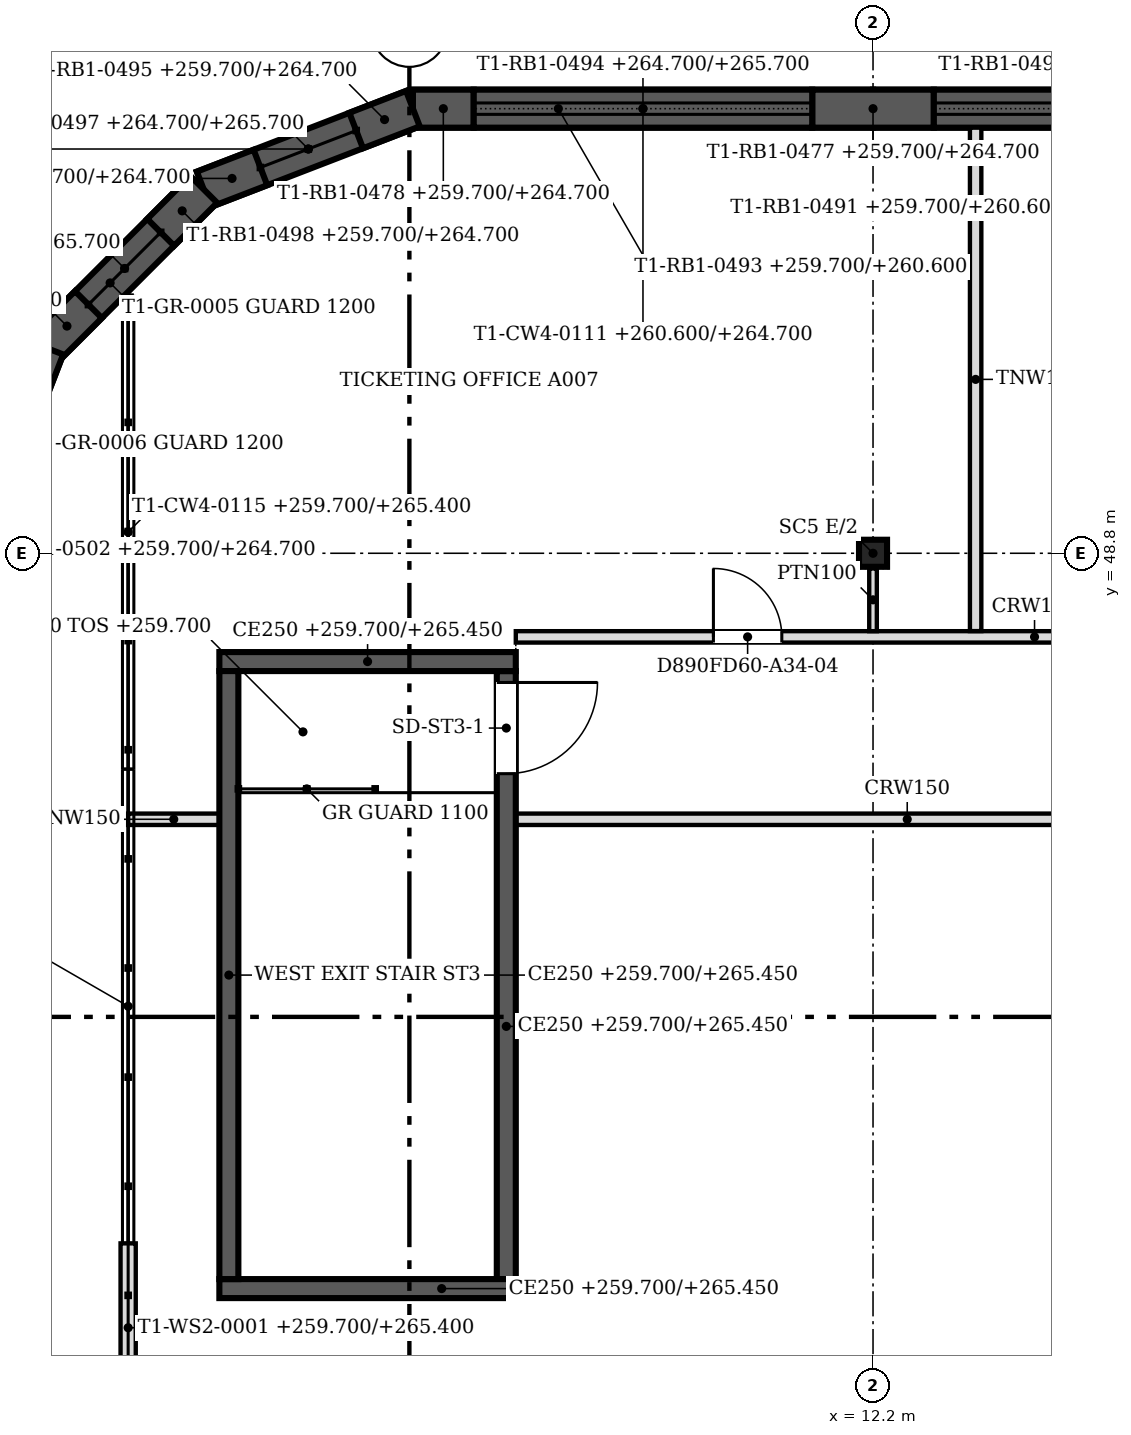
"""IFC4 building model, lengths in metres.
Left out: names, types, materials, properties, quantities, classifications, styles, units other than length and angle.
Written with IfcOpenShell. Run it as: python <this file> out.ifc"""

import sys

from ifc_helpers import new_model, si_unit, direction, frame, frame_2d, origin, origin_2d, place, context, subcontext, project, spatial, polyline, rectangle, i_section, outline, extrude, faceted_brep, source, transform, mapped, element, fill, save


model = new_model("IFC4")
c1 = context("Model", 3, precision=1e-05, world=origin(), true_north=direction((0.0, 1.0)))
c2 = subcontext(c1, "Body", "Model", "MODEL_VIEW")
j1 = project(units=[si_unit("LENGTHUNIT", "METRE"), si_unit("PLANEANGLEUNIT", "RADIAN")], contexts=[c1])
p1 = place(None, origin())
s1 = spatial("IfcSite", under=j1, at=p1, CompositionType="ELEMENT")
p2 = place(p1, origin())
s2 = spatial("IfcBuilding", under=s1, at=p2, CompositionType="ELEMENT")
p3 = place(p2, frame((0.0, 0.0, 259.7)))
s3 = spatial("IfcBuildingStorey", under=s2, at=p3, CompositionType="ELEMENT", Elevation=259.7)
p4 = place(p3, frame((12.2, 48.8, 0.0), z_axis=(0.0, 0.0, 1.0), x_axis=(1.0, 0.0, 0.0)))
e1 = element("IfcColumn", 1, at=p4, inside=s3, PredefinedType="COLUMN", context=c2, shape_type="SweptSolid", body=[
    extrude(i_section(OverallWidth=0.369, OverallDepth=0.356, WebThickness=0.011, FlangeThickness=0.018, at=origin_2d()), origin(), (0.0, 0.0, 1.0), 5.7),
])
m1 = source(origin(), c2, "Body", "SweptSolid", [
    extrude(outline(polyline([(0.0, 0.0), (1.6, 0.0), (1.6, 5.0), (0.0, 5.0), (0.0, 0.0)])), frame((0.0, 0.25, 0.0), z_axis=(0.0, -1.0, 0.0), x_axis=(1.0, 0.0, 0.0)), (0.0, 0.0, 1.0), 0.5),
])
p5 = place(p3, frame((13.0, 54.65, 0.0), z_axis=(0.0, 0.0, 1.0), x_axis=(-1.0, 0.0, 0.0)))
e2 = element("IfcWall", 2, at=p5, inside=s3, PredefinedType="SOLIDWALL", context=c2, shape_type="MappedRepresentation", body=[
    mapped(m1, transform((0.0, 0.0, 0.0), scale=1.0)),
])
m2 = source(origin(), c2, "Body", "Brep", [
    faceted_brep([(0.0, -0.25, 0.0), (0.8, -0.25, 0.0), (0.8, -0.25, 5.0), (0.0, -0.25, 5.0), (0.0, 0.25, 5.0), (0.753, 0.25, 5.0), (0.753, 0.25, 0.0), (0.0, 0.25, 0.0), (0.8, -0.0, 0.0), (0.8, -0.0, 5.0)], [[[0, 1, 2, 3]], [[4, 5, 6, 7]], [[7, 6, 8, 1, 0]], [[9, 2, 1, 8]], [[5, 4, 3, 2, 9]], [[4, 7, 0, 3]], [[8, 6, 5, 9]]]),
])
p6 = place(p3, frame((6.947, 54.65, 0.0), z_axis=(0.0, 0.0, 1.0), x_axis=(-1.0, 0.0, 0.0)))
e3 = element("IfcWall", 3, at=p6, inside=s3, PredefinedType="SOLIDWALL", context=c2, shape_type="MappedRepresentation", body=[
    mapped(m2, transform((0.0, 0.0, 0.0), scale=1.0)),
])
m3 = source(origin(), c2, "Body", "SweptSolid", [
    extrude(outline(polyline([(0.0, 0.0), (4.5, 0.0), (4.5, 0.9), (0.0, 0.9), (0.0, 0.0)])), frame((0.0, 0.25, 0.0), z_axis=(0.0, -1.0, 0.0), x_axis=(1.0, 0.0, 0.0)), (0.0, 0.0, 1.0), 0.5),
])
p7 = place(p3, frame((17.5, 54.65, 0.0), z_axis=(0.0, 0.0, 1.0), x_axis=(-1.0, 0.0, 0.0)))
e4 = element("IfcWall", 4, at=p7, inside=s3, PredefinedType="SOLIDWALL", context=c2, shape_type="MappedRepresentation", body=[
    mapped(m3, transform((0.0, 0.0, 0.0), scale=1.0)),
])
m4 = source(origin(), c2, "Body", "SweptSolid", [
    extrude(outline(polyline([(0.0, 0.0), (6.1, 0.0), (6.1, 1.0), (0.0, 1.0), (0.0, 0.0)])), frame((0.0, 0.25, 0.0), z_axis=(0.0, -1.0, 0.0), x_axis=(1.0, 0.0, 0.0)), (0.0, 0.0, 1.0), 0.5),
])
p8 = place(p3, frame((18.3, 54.65, 5.0), z_axis=(0.0, 0.0, 1.0), x_axis=(-1.0, 0.0, 0.0)))
e5 = element("IfcWall", 5, at=p8, inside=s3, PredefinedType="SOLIDWALL", context=c2, shape_type="MappedRepresentation", body=[
    mapped(m4, transform((0.0, 0.0, 0.0), scale=1.0)),
])
m5 = source(origin(), c2, "Body", "SweptSolid", [
    extrude(outline(polyline([(0.0, 0.0), (4.453, 0.0), (4.453, 0.9), (0.0, 0.9), (0.0, 0.0)])), frame((0.0, 0.25, 0.0), z_axis=(0.0, -1.0, 0.0), x_axis=(1.0, 0.0, 0.0)), (0.0, 0.0, 1.0), 0.5),
])
p9 = place(p3, frame((11.4, 54.65, 0.0), z_axis=(0.0, 0.0, 1.0), x_axis=(-1.0, 0.0, 0.0)))
e6 = element("IfcWall", 6, at=p9, inside=s3, PredefinedType="SOLIDWALL", context=c2, shape_type="MappedRepresentation", body=[
    mapped(m5, transform((0.0, 0.0, 0.0), scale=1.0)),
])
m6 = source(origin(), c2, "Body", "Brep", [
    faceted_brep([(0.0, -0.25, 0.0), (6.053, -0.25, 0.0), (6.053, -0.25, 1.0), (0.0, -0.25, 1.0), (0.0, 0.25, 1.0), (6.007, 0.25, 1.0), (6.007, 0.25, 0.0), (0.0, 0.25, 0.0), (6.053, 0.0, 0.0), (6.053, 0.0, 1.0)], [[[0, 1, 2, 3]], [[4, 5, 6, 7]], [[7, 6, 8, 1, 0]], [[9, 2, 1, 8]], [[5, 4, 3, 2, 9]], [[4, 7, 0, 3]], [[8, 6, 5, 9]]]),
])
p10 = place(p3, frame((12.2, 54.65, 5.0), z_axis=(0.0, 0.0, 1.0), x_axis=(-1.0, 0.0, 0.0)))
e7 = element("IfcWall", 7, at=p10, inside=s3, PredefinedType="SOLIDWALL", context=c2, shape_type="MappedRepresentation", body=[
    mapped(m6, transform((0.0, 0.0, 0.0), scale=1.0)),
])
m7 = source(origin(), c2, "Body", "Brep", [
    faceted_brep([(0.0, -0.25, 0.0), (0.8, -0.25, 0.0), (0.8, -0.25, 5.0), (0.0, -0.25, 5.0), (0.047, 0.25, 5.0), (0.8, 0.25, 5.0), (0.8, 0.25, 0.0), (0.047, 0.25, 0.0), (0.0, 0.0, 0.0), (0.0, 0.0, 5.0)], [[[0, 1, 2, 3]], [[4, 5, 6, 7]], [[7, 6, 1, 0, 8]], [[5, 4, 9, 3, 2]], [[8, 0, 3, 9]], [[7, 8, 9, 4]], [[1, 6, 5, 2]]]),
])
p11 = place(p3, frame((6.146, 54.65, 0.0), z_axis=(0.0, 0.0, 1.0), x_axis=(-0.93301483327, -0.3598379092, 0.0)))
e8 = element("IfcWall", 8, at=p11, inside=s3, PredefinedType="SOLIDWALL", context=c2, shape_type="MappedRepresentation", body=[
    mapped(m7, transform((0.0, 0.0, 0.0), scale=1.0)),
])
m8 = source(origin(), c2, "Body", "Brep", [
    faceted_brep([(0.0, -0.25, 0.0), (0.8, -0.25, 0.0), (0.8, -0.25, 5.0), (0.0, -0.25, 5.0), (0.0, 0.25, 5.0), (0.747, 0.25, 5.0), (0.747, 0.25, 0.0), (0.0, 0.25, 0.0), (0.8, -0.0, 0.0), (0.8, -0.0, 5.0)], [[[0, 1, 2, 3]], [[4, 5, 6, 7]], [[7, 6, 8, 1, 0]], [[9, 2, 1, 8]], [[5, 4, 3, 2, 9]], [[4, 7, 0, 3]], [[8, 6, 5, 9]]]),
])
p12 = place(p3, frame((4.14, 53.876, 0.0), z_axis=(0.0, 0.0, 1.0), x_axis=(-0.93301483327, -0.3598379092, 0.0)))
e9 = element("IfcWall", 9, at=p12, inside=s3, PredefinedType="SOLIDWALL", context=c2, shape_type="MappedRepresentation", body=[
    mapped(m8, transform((0.0, 0.0, 0.0), scale=1.0)),
])
m9 = source(origin(), c2, "Body", "Brep", [
    faceted_brep([(0.0, -0.25, 0.0), (2.95, -0.25, 0.0), (2.95, -0.25, 1.0), (0.0, -0.25, 1.0), (0.047, 0.25, 1.0), (2.898, 0.25, 1.0), (2.898, 0.25, 0.0), (0.047, 0.25, 0.0), (2.95, 0.0, 0.0), (0.0, 0.0, 0.0), (2.95, 0.0, 1.0), (0.0, 0.0, 1.0)], [[[0, 1, 2, 3]], [[4, 5, 6, 7]], [[7, 6, 8, 1, 0, 9]], [[10, 2, 1, 8]], [[5, 4, 11, 3, 2, 10]], [[9, 0, 3, 11]], [[7, 9, 11, 4]], [[8, 6, 5, 10]]]),
])
p13 = place(p3, frame((6.146, 54.65, 5.0), z_axis=(0.0, 0.0, 1.0), x_axis=(-0.932999673775, -0.359877213415, 0.0)))
e10 = element("IfcWall", 10, at=p13, inside=s3, PredefinedType="SOLIDWALL", context=c2, shape_type="MappedRepresentation", body=[
    mapped(m9, transform((0.0, 0.0, 0.0), scale=1.0)),
])
m10 = source(origin(), c2, "Body", "Brep", [
    faceted_brep([(0.0, -0.25, 0.0), (0.8, -0.25, 0.0), (0.8, -0.25, 5.0), (0.0, -0.25, 5.0), (0.053, 0.25, 5.0), (0.8, 0.25, 5.0), (0.8, 0.25, 0.0), (0.053, 0.25, 0.0), (0.0, 0.0, 0.0), (0.0, 0.0, 5.0)], [[[0, 1, 2, 3]], [[4, 5, 6, 7]], [[7, 6, 1, 0, 8]], [[5, 4, 9, 3, 2]], [[8, 0, 3, 9]], [[7, 8, 9, 4]], [[1, 6, 5, 2]]]),
])
p14 = place(p3, frame((3.394, 53.588, 0.0), z_axis=(0.0, 0.0, 1.0), x_axis=(-0.707106781187, -0.707106781187, 0.0)))
e11 = element("IfcWall", 11, at=p14, inside=s3, PredefinedType="SOLIDWALL", context=c2, shape_type="MappedRepresentation", body=[
    mapped(m10, transform((0.0, 0.0, 0.0), scale=1.0)),
])
m11 = source(origin(), c2, "Body", "Brep", [
    faceted_brep([(0.0, -0.25, 0.0), (0.8, -0.25, 0.0), (0.8, -0.25, 5.0), (0.0, -0.25, 5.0), (0.0, 0.25, 5.0), (0.747, 0.25, 5.0), (0.747, 0.25, 0.0), (0.0, 0.25, 0.0), (0.8, -0.0, 0.0), (0.8, -0.0, 5.0)], [[[0, 1, 2, 3]], [[4, 5, 6, 7]], [[7, 6, 8, 1, 0]], [[9, 2, 1, 8]], [[5, 4, 3, 2, 9]], [[4, 7, 0, 3]], [[8, 6, 5, 9]]]),
])
p15 = place(p3, frame((1.878, 52.072, 0.0), z_axis=(0.0, 0.0, 1.0), x_axis=(-0.707259322823, -0.706954206636, 0.0)))
e12 = element("IfcWall", 12, at=p15, inside=s3, PredefinedType="SOLIDWALL", context=c2, shape_type="MappedRepresentation", body=[
    mapped(m11, transform((0.0, 0.0, 0.0), scale=1.0)),
])
m12 = source(origin(), c2, "Body", "Brep", [
    faceted_brep([(0.0, -0.25, 0.0), (2.944, -0.25, 0.0), (2.944, -0.25, 1.0), (0.0, -0.25, 1.0), (0.053, 0.25, 1.0), (2.891, 0.25, 1.0), (2.891, 0.25, 0.0), (0.053, 0.25, 0.0), (2.944, 0.0, 0.0), (0.0, 0.0, 0.0), (2.944, 0.0, 1.0), (0.0, 0.0, 1.0)], [[[0, 1, 2, 3]], [[4, 5, 6, 7]], [[7, 6, 8, 1, 0, 9]], [[10, 2, 1, 8]], [[5, 4, 11, 3, 2, 10]], [[9, 0, 3, 11]], [[7, 9, 11, 4]], [[8, 6, 5, 10]]]),
])
p16 = place(p3, frame((3.394, 53.588, 5.0), z_axis=(0.0, 0.0, 1.0), x_axis=(-0.707106781187, -0.707106781187, 0.0)))
e13 = element("IfcWall", 13, at=p16, inside=s3, PredefinedType="SOLIDWALL", context=c2, shape_type="MappedRepresentation", body=[
    mapped(m12, transform((0.0, 0.0, 0.0), scale=1.0)),
])
m13 = source(origin(), c2, "Body", "Brep", [
    faceted_brep([(0.0, -0.25, 0.0), (0.8, -0.25, 0.0), (0.8, -0.25, 5.0), (0.0, -0.25, 5.0), (0.053, 0.25, 5.0), (0.8, 0.25, 5.0), (0.8, 0.25, 0.0), (0.053, 0.25, 0.0), (0.0, 0.0, 0.0), (0.0, 0.0, 5.0)], [[[0, 1, 2, 3]], [[4, 5, 6, 7]], [[7, 6, 1, 0, 8]], [[5, 4, 9, 3, 2]], [[8, 0, 3, 9]], [[7, 8, 9, 4]], [[1, 6, 5, 2]]]),
])
p17 = place(p3, frame((1.312, 51.506, 0.0), z_axis=(0.0, 0.0, 1.0), x_axis=(-0.360001058183, -0.932951894851, 0.0)))
e14 = element("IfcWall", 14, at=p17, inside=s3, PredefinedType="SOLIDWALL", context=c2, shape_type="MappedRepresentation", body=[
    mapped(m13, transform((0.0, 0.0, 0.0), scale=1.0)),
])
m14 = source(origin(), c2, "Body", "Brep", [
    faceted_brep([(0.0, -0.25, 0.0), (2.95, -0.25, 0.0), (2.95, -0.25, 1.0), (0.0, -0.25, 1.0), (0.053, 0.25, 1.0), (2.904, 0.25, 1.0), (2.904, 0.25, 0.0), (0.053, 0.25, 0.0), (2.95, 0.0, 0.0), (0.0, 0.0, 0.0), (2.95, 0.0, 1.0), (0.0, 0.0, 1.0)], [[[0, 1, 2, 3]], [[4, 5, 6, 7]], [[7, 6, 8, 1, 0, 9]], [[10, 2, 1, 8]], [[5, 4, 11, 3, 2, 10]], [[9, 0, 3, 11]], [[7, 9, 11, 4]], [[8, 6, 5, 10]]]),
])
p18 = place(p3, frame((1.312, 51.506, 5.0), z_axis=(0.0, 0.0, 1.0), x_axis=(-0.359921456299, -0.932982607178, 0.0)))
e15 = element("IfcWall", 15, at=p18, inside=s3, PredefinedType="SOLIDWALL", context=c2, shape_type="MappedRepresentation", body=[
    mapped(m14, transform((0.0, 0.0, 0.0), scale=1.0)),
])
p19 = place(p3, frame((2.4, 33.48, 0.0), z_axis=(0.0, 0.0, 1.0), x_axis=(0.0, 1.0, 0.0)))
e16 = element("IfcWall", 16, at=p19, inside=s3, PredefinedType="PARTITIONING", context=c2, shape_type="SweptSolid", body=[
    extrude(rectangle(XDim=6.24, YDim=0.2, at=frame_2d((3.12, 0.0))), origin(), (0.0, 0.0, 1.0), 5.7),
])
m15 = source(origin(), c2, "Body", "SweptSolid", [
    extrude(rectangle(XDim=1.8, YDim=2.7, at=frame_2d((0.9, 1.35))), frame((0.0, 0.11, 0.0), z_axis=(0.0, -1.0, 0.0), x_axis=(1.0, 0.0, 0.0)), (0.0, 0.0, 1.0), 0.22),
])
p20 = place(p19, frame((2.22, 0.0, 0.0)))
e17 = element("IfcOpeningElement", 17, at=p20, cuts=e16, PredefinedType="OPENING", context=c2, shape_type="MappedRepresentation", body=[
    mapped(m15, transform((0.0, 0.0, 0.0), scale=1.0)),
])
m16 = source(origin(), c2, "Body", "SweptSolid", [
    extrude(outline(polyline([(0.12, 0.1), (2.1, 0.1), (2.1, 5.6), (0.12, 5.6), (0.12, 0.1)])), frame((0.0, 0.11, 0.0), z_axis=(0.0, -1.0, 0.0), x_axis=(1.0, 0.0, 0.0)), (0.0, 0.0, 1.0), 0.22),
])
p21 = place(p19, origin())
e18 = element("IfcOpeningElement", 18, at=p21, cuts=e16, PredefinedType="OPENING", context=c2, shape_type="MappedRepresentation", body=[
    mapped(m16, transform((0.0, 0.0, 0.0), scale=1.0)),
])
m17 = source(origin(), c2, "Body", "SweptSolid", [
    extrude(outline(polyline([(4.14, 0.1), (6.12, 0.1), (6.12, 5.6), (4.14, 5.6), (4.14, 0.1)])), frame((0.0, 0.11, 0.0), z_axis=(0.0, -1.0, 0.0), x_axis=(1.0, 0.0, 0.0)), (0.0, 0.0, 1.0), 0.22),
])
p22 = place(p19, origin())
e19 = element("IfcOpeningElement", 19, at=p22, cuts=e16, PredefinedType="OPENING", context=c2, shape_type="MappedRepresentation", body=[
    mapped(m17, transform((0.0, 0.0, 0.0), scale=1.0)),
])
m18 = source(origin(), c2, "Body", "SweptSolid", [
    extrude(outline(polyline([(2.22, 2.82), (4.02, 2.82), (4.02, 5.6), (2.22, 5.6), (2.22, 2.82)])), frame((0.0, 0.11, 0.0), z_axis=(0.0, -1.0, 0.0), x_axis=(1.0, 0.0, 0.0)), (0.0, 0.0, 1.0), 0.22),
])
p23 = place(p19, origin())
e20 = element("IfcOpeningElement", 20, at=p23, cuts=e16, PredefinedType="OPENING", context=c2, shape_type="MappedRepresentation", body=[
    mapped(m18, transform((0.0, 0.0, 0.0), scale=1.0)),
])
p24 = place(p3, frame((7.5, 39.125, 0.0), z_axis=(0.0, 0.0, 1.0), x_axis=(-1.0, 0.0, 0.0)))
e21 = element("IfcWall", 21, at=p24, inside=s3, PredefinedType="SOLIDWALL", context=c2, shape_type="SweptSolid", body=[
    extrude(rectangle(XDim=3.9, YDim=0.25, at=frame_2d((1.95, 0.0))), origin(), (0.0, 0.0, 1.0), 5.75),
])
p25 = place(p3, frame((3.725, 39.25, 0.0), z_axis=(0.0, 0.0, 1.0), x_axis=(0.0, 1.0, 0.0)))
e22 = element("IfcWall", 22, at=p25, inside=s3, PredefinedType="SOLIDWALL", context=c2, shape_type="SweptSolid", body=[
    extrude(rectangle(XDim=8.0, YDim=0.25, at=frame_2d((4.0, 0.0))), origin(), (0.0, 0.0, 1.0), 5.75),
])
p26 = place(p3, frame((3.6, 47.375, 0.0), z_axis=(0.0, 0.0, 1.0), x_axis=(1.0, 0.0, 0.0)))
e23 = element("IfcWall", 23, at=p26, inside=s3, PredefinedType="SOLIDWALL", context=c2, shape_type="SweptSolid", body=[
    extrude(rectangle(XDim=3.9, YDim=0.25, at=frame_2d((1.95, 0.0))), origin(), (0.0, 0.0, 1.0), 5.75),
])
p27 = place(p3, frame((7.375, 47.25, 0.0), z_axis=(0.0, 0.0, 1.0), x_axis=(0.0, -1.0, 0.0)))
e24 = element("IfcWall", 24, at=p27, inside=s3, PredefinedType="SOLIDWALL", context=c2, shape_type="SweptSolid", body=[
    extrude(rectangle(XDim=8.0, YDim=0.25, at=frame_2d((4.0, 0.0))), origin(), (0.0, 0.0, 1.0), 5.75),
])
m19 = source(origin(), c2, "Body", "SweptSolid", [
    extrude(rectangle(XDim=1.2, YDim=2.1, at=frame_2d((0.6, 1.05))), frame((0.0, 0.135, 0.0), z_axis=(0.0, -1.0, 0.0), x_axis=(1.0, 0.0, 0.0)), (0.0, 0.0, 1.0), 0.27),
])
p28 = place(p27, frame((0.15, 0.0, 0.0)))
e25 = element("IfcOpeningElement", 25, at=p28, cuts=e24, PredefinedType="OPENING", context=c2, shape_type="MappedRepresentation", body=[
    mapped(m19, transform((0.0, 0.0, 0.0), scale=1.0)),
])
p29 = place(p3, frame((2.4, 45.3, 0.0), z_axis=(0.0, 0.0, 1.0), x_axis=(1.0, 0.0, 0.0)))
e26 = element("IfcWall", 26, at=p29, inside=s3, PredefinedType="PARTITIONING", context=c2, shape_type="SweptSolid", body=[
    extrude(rectangle(XDim=1.2, YDim=0.15, at=frame_2d((0.6, 0.0))), origin(), (0.0, 0.0, 1.0), 5.167),
])
p30 = place(p3, frame((7.5, 45.3, 0.0), z_axis=(0.0, 0.0, 1.0), x_axis=(1.0, 0.0, 0.0)))
e27 = element("IfcWall", 27, at=p30, inside=s3, PredefinedType="PARTITIONING", context=c2, shape_type="SweptSolid", body=[
    extrude(rectangle(XDim=20.6, YDim=0.15, at=frame_2d((10.3, 0.0))), origin(), (0.0, 0.0, 1.0), 5.167),
])
p31 = place(p3, frame((7.5, 47.7, 0.0), z_axis=(0.0, 0.0, 1.0), x_axis=(1.0, 0.0, 0.0)))
e28 = element("IfcWall", 28, at=p31, inside=s3, PredefinedType="PARTITIONING", context=c2, shape_type="SweptSolid", body=[
    extrude(rectangle(XDim=20.6, YDim=0.15, at=frame_2d((10.3, 0.0))), origin(), (0.0, 0.0, 1.0), 5.167),
])
m20 = source(origin(), c2, "Body", "SweptSolid", [
    extrude(rectangle(XDim=0.9, YDim=2.1, at=frame_2d((0.45, 1.05))), frame((0.0, 0.085, 0.0), z_axis=(0.0, -1.0, 0.0), x_axis=(1.0, 0.0, 0.0)), (0.0, 0.0, 1.0), 0.17),
])
p32 = place(p31, frame((17.401, 0.0, 0.0)))
e29 = element("IfcOpeningElement", 29, at=p32, cuts=e28, PredefinedType="OPENING", context=c2, shape_type="MappedRepresentation", body=[
    mapped(m20, transform((0.0, 0.0, 0.0), scale=1.0)),
])
p33 = place(p31, frame((2.6, 0.0, 0.0)))
e30 = element("IfcOpeningElement", 30, at=p33, cuts=e28, PredefinedType="OPENING", context=c2, shape_type="MappedRepresentation", body=[
    mapped(m20, transform((0.0, 0.0, 0.0), scale=1.0)),
])
p34 = place(p31, frame((10.15, 0.0, 0.0)))
e31 = element("IfcOpeningElement", 31, at=p34, cuts=e28, PredefinedType="OPENING", context=c2, shape_type="MappedRepresentation", body=[
    mapped(m20, transform((0.0, 0.0, 0.0), scale=1.0)),
])
p35 = place(p3, frame((13.55, 47.776, 0.0), z_axis=(0.0, 0.0, 1.0), x_axis=(0.0, 1.0, 0.0)))
e32 = element("IfcWall", 32, at=p35, inside=s3, PredefinedType="PARTITIONING", context=c2, shape_type="SweptSolid", body=[
    extrude(rectangle(XDim=6.624, YDim=0.15, at=frame_2d((3.312, 0.0))), origin(), (0.0, 0.0, 1.0), 5.167),
])
p36 = place(p3, frame((12.2, 48.6, 0.0), z_axis=(0.0, 0.0, 1.0), x_axis=(0.0, -1.0, 0.0)))
e33 = element("IfcWall", 33, at=p36, inside=s3, PredefinedType="PARTITIONING", context=c2, shape_type="SweptSolid", body=[
    extrude(rectangle(XDim=0.825, YDim=0.1, at=frame_2d((0.413, 0.0))), origin(), (0.0, 0.0, 1.0), 5.167),
])
m21 = source(origin(), c2, "Body", "SweptSolid", [
    extrude(rectangle(XDim=1.2, YDim=2.1, at=frame_2d((0.6, 1.05))), frame((0.0, 0.025, 0.0), z_axis=(0.0, -1.0, 0.0), x_axis=(1.0, 0.0, 0.0)), (0.0, 0.0, 1.0), 0.05),
])
p37 = place(p28, origin())
e34 = element("IfcDoor", 34, at=p37, inside=s3, OperationType="SINGLE_SWING_LEFT", PredefinedType="DOOR", context=c2, shape_type="MappedRepresentation", body=[
    mapped(m21, transform((0.0, 0.0, 0.0), scale=1.0)),
])
fill(e25, e34)
m22 = source(origin(), c2, "Body", "SweptSolid", [
    extrude(rectangle(XDim=0.9, YDim=2.1, at=frame_2d((0.45, 1.05))), frame((0.0, 0.025, 0.0), z_axis=(0.0, -1.0, 0.0), x_axis=(1.0, 0.0, 0.0)), (0.0, 0.0, 1.0), 0.05),
])
p38 = place(p33, origin())
e35 = element("IfcDoor", 35, at=p38, inside=s3, OperationType="SINGLE_SWING_LEFT", PredefinedType="DOOR", context=c2, shape_type="MappedRepresentation", body=[
    mapped(m22, transform((0.0, 0.0, 0.0), scale=1.0)),
])
fill(e30, e35)
save(model, sys.argv[1])
